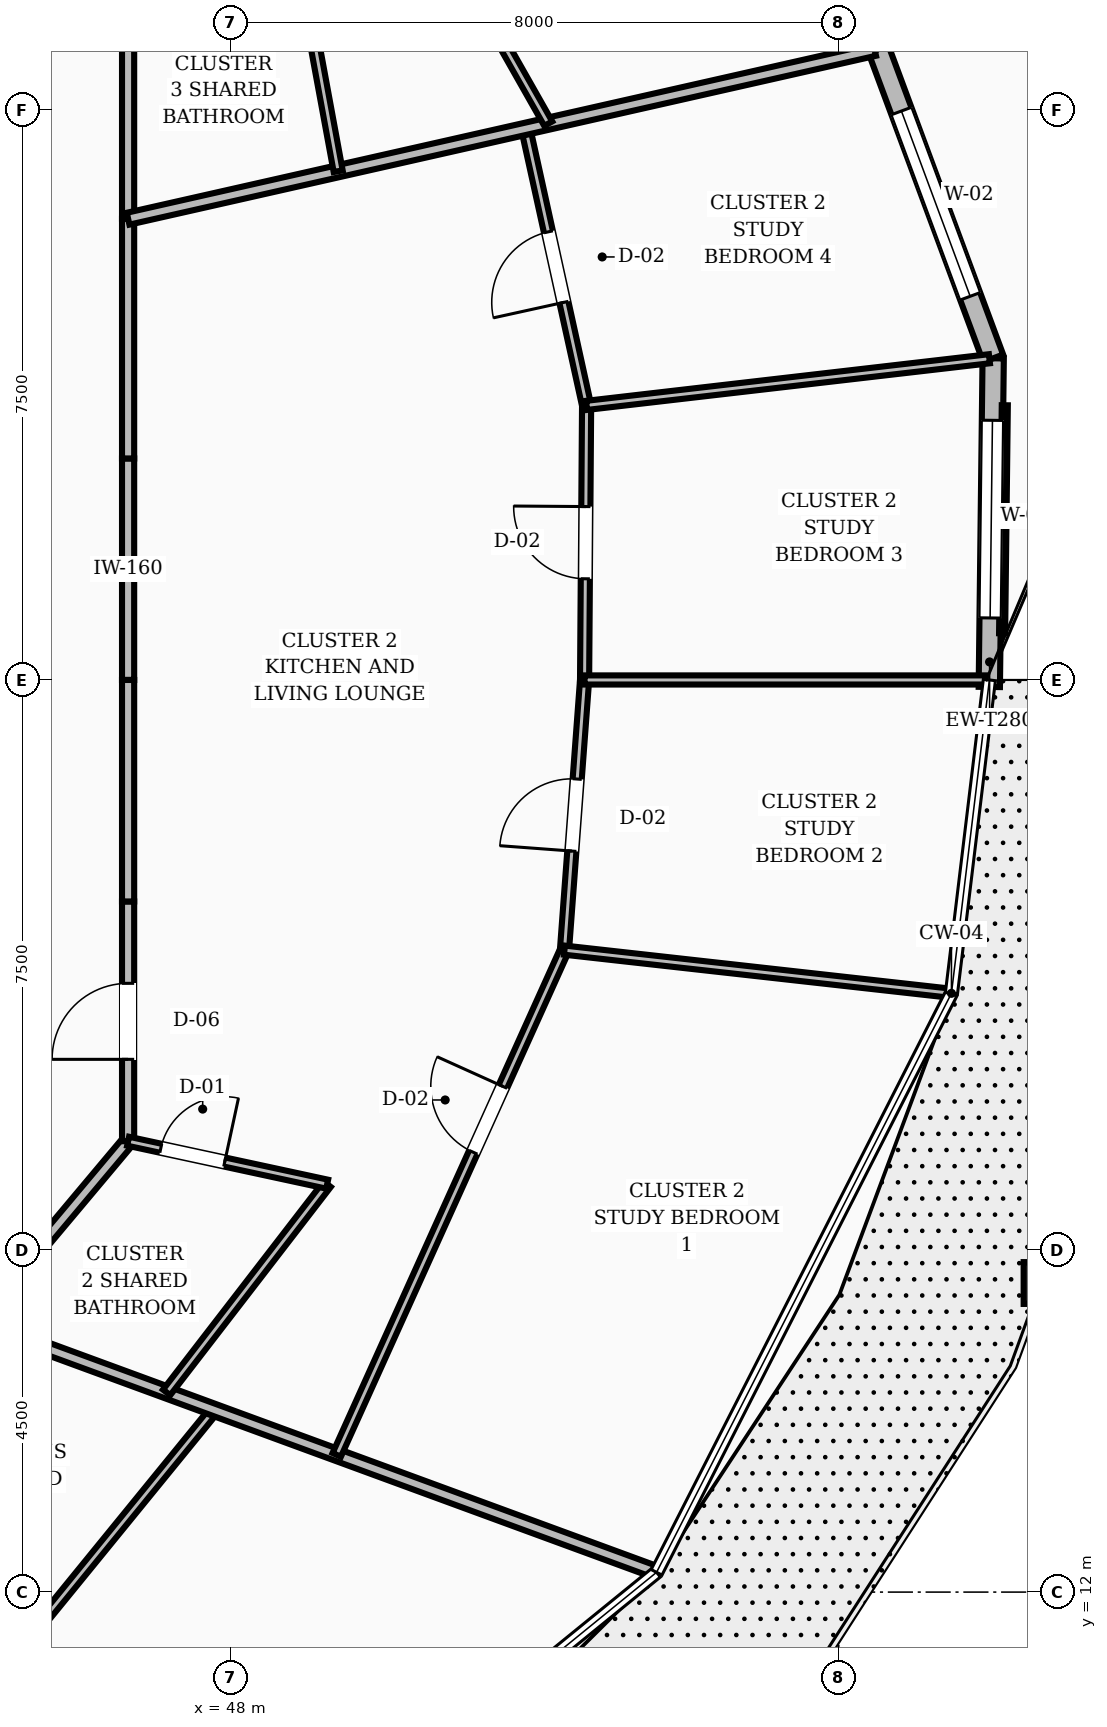
"""IFC4 building model, lengths in metres.
Left out: names, types, materials, properties, quantities, classifications, styles, units other than length and angle.
Written with IfcOpenShell. Run it as: python <this file> out.ifc"""

import sys

from ifc_helpers import new_model, si_unit, direction, frame, frame_2d, origin, place, context, subcontext, project, spatial, rectangle, extrude, element, fill, save


model = new_model("IFC4")
c1 = context("Model", 3, precision=1e-05, world=origin(), true_north=direction((0.0, 1.0)))
c2 = subcontext(c1, "Body", "Model", "MODEL_VIEW")
j1 = project(units=[si_unit("LENGTHUNIT", "METRE"), si_unit("PLANEANGLEUNIT", "RADIAN")], contexts=[c1])
p1 = place(None, origin())
s1 = spatial("IfcSite", under=j1, at=p1, CompositionType="ELEMENT")
p2 = place(p1, origin())
s2 = spatial("IfcBuilding", under=s1, at=p2, CompositionType="ELEMENT")
p3 = place(p2, frame((0.0, 0.0, 135.2)))
s3 = spatial("IfcBuildingStorey", under=s2, at=p3, CompositionType="ELEMENT", Elevation=135.2)
p4 = place(p3, frame((57.98, 23.908, 0.0), z_axis=(0.0, 0.0, 1.0), x_axis=(0.011800420546, 0.999930372613, 0.0)))
e1 = element("IfcWall", 1, at=p4, inside=s3, PredefinedType="STANDARD", context=c2, shape_type="SweptSolid", body=[
    extrude(rectangle(XDim=4.324, YDim=0.28, at=frame_2d((2.162, 0.0))), origin(), (0.0, 0.0, 1.0), 2.82),
])
p5 = place(p4, frame((0.908, 0.0, 0.8)))
e2 = element("IfcOpeningElement", 2, at=p5, cuts=e1, PredefinedType="OPENING", context=c2, shape_type="SweptSolid", body=[
    extrude(rectangle(XDim=2.6, YDim=1.65, at=frame_2d((1.3, 0.825))), frame((0.0, 0.15, 0.0), z_axis=(0.0, -1.0, 0.0), x_axis=(1.0, 0.0, 0.0)), (0.0, 0.0, 1.0), 0.3),
])
p6 = place(p3, frame((58.031, 28.232, 0.0), z_axis=(0.0, 0.0, 1.0), x_axis=(-0.347959140817, 0.937509699321, 0.0)))
e3 = element("IfcWall", 3, at=p6, inside=s3, PredefinedType="STANDARD", context=c2, shape_type="SweptSolid", body=[
    extrude(rectangle(XDim=4.34, YDim=0.28, at=frame_2d((2.17, 0.0))), origin(), (0.0, 0.0, 1.0), 2.82),
])
p7 = place(p6, frame((0.87, 0.0, 0.8)))
e4 = element("IfcOpeningElement", 4, at=p7, cuts=e3, PredefinedType="OPENING", context=c2, shape_type="SweptSolid", body=[
    extrude(rectangle(XDim=2.6, YDim=1.65, at=frame_2d((1.3, 0.825))), frame((0.0, 0.15, 0.0), z_axis=(0.0, -1.0, 0.0), x_axis=(1.0, 0.0, 0.0)), (0.0, 0.0, 1.0), 0.3),
])
p8 = place(p3, frame((56.521, 32.301, 0.0), z_axis=(0.0, 0.0, 1.0), x_axis=(-0.547360926274, 0.83689665813, 0.0)))
e5 = element("IfcWall", 5, at=p8, inside=s3, PredefinedType="STANDARD", context=c2, shape_type="SweptSolid", body=[
    extrude(rectangle(XDim=4.481, YDim=0.28, at=frame_2d((2.24, 0.0))), origin(), (0.0, 0.0, 1.0), 2.82),
])
p9 = place(p3, frame((46.65, 24.0, 0.0), z_axis=(0.0, 0.0, 1.0), x_axis=(0.0, 1.0, 0.0)))
e6 = element("IfcWall", 6, at=p9, inside=s3, PredefinedType="SOLIDWALL", context=c2, shape_type="SweptSolid", body=[
    extrude(rectangle(XDim=2.914, YDim=0.16, at=frame_2d((1.457, 0.0))), origin(), (0.0, 0.0, 1.0), 2.8),
])
p10 = place(p3, frame((46.65, 26.914, 0.0), z_axis=(0.0, 0.0, 1.0), x_axis=(0.0, 1.0, 0.0)))
e7 = element("IfcWall", 7, at=p10, inside=s3, PredefinedType="SOLIDWALL", context=c2, shape_type="SweptSolid", body=[
    extrude(rectangle(XDim=3.154, YDim=0.16, at=frame_2d((1.577, 0.0))), origin(), (0.0, 0.0, 1.0), 2.8),
])
p11 = place(p3, frame((46.65, 30.068, 0.0), z_axis=(0.0, 0.0, 1.0), x_axis=(0.0, 1.0, 0.0)))
e8 = element("IfcWall", 8, at=p11, inside=s3, PredefinedType="SOLIDWALL", context=c2, shape_type="SweptSolid", body=[
    extrude(rectangle(XDim=3.721, YDim=0.16, at=frame_2d((1.86, 0.0))), origin(), (0.0, 0.0, 1.0), 2.8),
])
p12 = place(p3, frame((44.65, 15.548, 0.0), z_axis=(0.0, 0.0, 1.0), x_axis=(0.642665742791, 0.76614668507, 0.0)))
e9 = element("IfcWall", 9, at=p12, inside=s3, PredefinedType="SOLIDWALL", context=c2, shape_type="SweptSolid", body=[
    extrude(rectangle(XDim=3.112, YDim=0.16, at=frame_2d((1.556, 0.0))), origin(), (0.0, 0.0, 1.0), 2.8),
])
p13 = place(p3, frame((46.65, 17.932, 0.0), z_axis=(0.0, 0.0, 1.0), x_axis=(0.0, 1.0, 0.0)))
e10 = element("IfcWall", 10, at=p13, inside=s3, PredefinedType="SOLIDWALL", context=c2, shape_type="SweptSolid", body=[
    extrude(rectangle(XDim=3.154, YDim=0.16, at=frame_2d((1.577, 0.0))), origin(), (0.0, 0.0, 1.0), 2.8),
])
p14 = place(p13, frame((1.077, 0.0, 0.0)))
e11 = element("IfcOpeningElement", 11, at=p14, cuts=e10, PredefinedType="OPENING", context=c2, shape_type="SweptSolid", body=[
    extrude(rectangle(XDim=1.0, YDim=2.1, at=frame_2d((0.5, 1.05))), frame((0.0, 0.09, 0.0), z_axis=(0.0, -1.0, 0.0), x_axis=(1.0, 0.0, 0.0)), (0.0, 0.0, 1.0), 0.18),
])
p15 = place(p3, frame((46.65, 21.086, 0.0), z_axis=(0.0, 0.0, 1.0), x_axis=(0.0, 1.0, 0.0)))
e12 = element("IfcWall", 12, at=p15, inside=s3, PredefinedType="SOLIDWALL", context=c2, shape_type="SweptSolid", body=[
    extrude(rectangle(XDim=2.914, YDim=0.16, at=frame_2d((1.457, 0.0))), origin(), (0.0, 0.0, 1.0), 2.8),
])
p16 = place(p3, frame((45.548, 11.653, 0.0), z_axis=(0.0, 0.0, 1.0), x_axis=(0.631651457384, 0.775252498471, 0.0)))
e13 = element("IfcWall", 13, at=p16, inside=s3, PredefinedType="PARTITIONING", context=c2, shape_type="SweptSolid", body=[
    extrude(rectangle(XDim=3.54, YDim=0.12, at=frame_2d((1.77, 0.0))), origin(), (0.0, 0.0, 1.0), 2.8),
])
p17 = place(p3, frame((44.65, 15.548, 0.0), z_axis=(0.0, 0.0, 1.0), x_axis=(0.938723462169, -0.344671236939, 0.0)))
e14 = element("IfcWall", 14, at=p17, inside=s3, PredefinedType="SOLIDWALL", context=c2, shape_type="SweptSolid", body=[
    extrude(rectangle(XDim=9.487, YDim=0.16, at=frame_2d((4.744, 0.0))), origin(), (0.0, 0.0, 1.0), 2.8),
])
p18 = place(p3, frame((47.157, 14.627, 0.0), z_axis=(0.0, 0.0, 1.0), x_axis=(0.610617608408, 0.791925587604, 0.0)))
e15 = element("IfcWall", 15, at=p18, inside=s3, PredefinedType="PARTITIONING", context=c2, shape_type="SweptSolid", body=[
    extrude(rectangle(XDim=3.459, YDim=0.12, at=frame_2d((1.729, 0.0))), origin(), (0.0, 0.0, 1.0), 2.8),
])
p19 = place(p3, frame((46.65, 17.932, 0.0), z_axis=(0.0, 0.0, 1.0), x_axis=(0.97750005093, -0.21093518064, 0.0)))
e16 = element("IfcWall", 16, at=p19, inside=s3, PredefinedType="PARTITIONING", context=c2, shape_type="SweptSolid", body=[
    extrude(rectangle(XDim=2.679, YDim=0.12, at=frame_2d((1.34, 0.0))), origin(), (0.0, 0.0, 1.0), 2.8),
])
p20 = place(p19, frame((0.44, 0.0, 0.0)))
e17 = element("IfcOpeningElement", 17, at=p20, cuts=e16, PredefinedType="OPENING", context=c2, shape_type="SweptSolid", body=[
    extrude(rectangle(XDim=0.86, YDim=2.1, at=frame_2d((0.43, 1.05))), frame((0.0, 0.07, 0.0), z_axis=(0.0, -1.0, 0.0), x_axis=(1.0, 0.0, 0.0)), (0.0, 0.0, 1.0), 0.14),
])
p21 = place(p3, frame((49.395, 13.805, 0.0), z_axis=(0.0, 0.0, 1.0), x_axis=(0.411281396403, 0.911508427264, 0.0)))
e18 = element("IfcWall", 18, at=p21, inside=s3, PredefinedType="PARTITIONING", context=c2, shape_type="SweptSolid", body=[
    extrude(rectangle(XDim=7.285, YDim=0.12, at=frame_2d((3.642, 0.0))), origin(), (0.0, 0.0, 1.0), 2.8),
])
p22 = place(p21, frame((4.367, 0.0, 0.0)))
e19 = element("IfcOpeningElement", 19, at=p22, cuts=e18, PredefinedType="OPENING", context=c2, shape_type="SweptSolid", body=[
    extrude(rectangle(XDim=0.95, YDim=2.1, at=frame_2d((0.475, 1.05))), frame((0.0, 0.07, 0.0), z_axis=(0.0, -1.0, 0.0), x_axis=(1.0, 0.0, 0.0)), (0.0, 0.0, 1.0), 0.14),
])
p23 = place(p3, frame((52.391, 20.446, 0.0), z_axis=(0.0, 0.0, 1.0), x_axis=(0.074182020041, 0.997244718162, 0.0)))
e20 = element("IfcWall", 20, at=p23, inside=s3, PredefinedType="PARTITIONING", context=c2, shape_type="SweptSolid", body=[
    extrude(rectangle(XDim=3.564, YDim=0.12, at=frame_2d((1.782, 0.0))), origin(), (0.0, 0.0, 1.0), 2.8),
])
p24 = place(p23, frame((1.307, 0.0, 0.0)))
e21 = element("IfcOpeningElement", 21, at=p24, cuts=e20, PredefinedType="OPENING", context=c2, shape_type="SweptSolid", body=[
    extrude(rectangle(XDim=0.95, YDim=2.1, at=frame_2d((0.475, 1.05))), frame((0.0, 0.07, 0.0), z_axis=(0.0, -1.0, 0.0), x_axis=(1.0, 0.0, 0.0)), (0.0, 0.0, 1.0), 0.14),
])
p25 = place(p3, frame((52.391, 20.446, 0.0), z_axis=(0.0, 0.0, 1.0), x_axis=(0.993832563856, -0.110891095313, 0.0)))
e22 = element("IfcWall", 22, at=p25, inside=s3, PredefinedType="PARTITIONING", context=c2, shape_type="SweptSolid", body=[
    extrude(rectangle(XDim=5.073, YDim=0.12, at=frame_2d((2.536, 0.0))), origin(), (0.0, 0.0, 1.0), 2.8),
])
p26 = place(p3, frame((52.656, 24.0, 0.0), z_axis=(0.0, 0.0, 1.0), x_axis=(0.007366656013, 0.999972865821, 0.0)))
e23 = element("IfcWall", 23, at=p26, inside=s3, PredefinedType="PARTITIONING", context=c2, shape_type="SweptSolid", body=[
    extrude(rectangle(XDim=3.612, YDim=0.12, at=frame_2d((1.806, 0.0))), origin(), (0.0, 0.0, 1.0), 2.8),
])
p27 = place(p26, frame((1.331, 0.0, 0.0)))
e24 = element("IfcOpeningElement", 24, at=p27, cuts=e23, PredefinedType="OPENING", context=c2, shape_type="SweptSolid", body=[
    extrude(rectangle(XDim=0.95, YDim=2.1, at=frame_2d((0.475, 1.05))), frame((0.0, 0.07, 0.0), z_axis=(0.0, -1.0, 0.0), x_axis=(1.0, 0.0, 0.0)), (0.0, 0.0, 1.0), 0.14),
])
p28 = place(p3, frame((52.656, 24.0, 0.0), z_axis=(0.0, 0.0, 1.0), x_axis=(1.0, 0.0, 0.0)))
e25 = element("IfcWall", 25, at=p28, inside=s3, PredefinedType="PARTITIONING", context=c2, shape_type="SweptSolid", body=[
    extrude(rectangle(XDim=5.276, YDim=0.12, at=frame_2d((2.638, 0.0))), origin(), (0.0, 0.0, 1.0), 2.8),
])
p29 = place(p3, frame((52.682, 27.612, 0.0), z_axis=(0.0, 0.0, 1.0), x_axis=(-0.214841783998, 0.976648866199, 0.0)))
e26 = element("IfcWall", 26, at=p29, inside=s3, PredefinedType="PARTITIONING", context=c2, shape_type="SweptSolid", body=[
    extrude(rectangle(XDim=3.726, YDim=0.12, at=frame_2d((1.863, 0.0))), origin(), (0.0, 0.0, 1.0), 2.8),
])
p30 = place(p29, frame((1.388, 0.0, 0.0)))
e27 = element("IfcOpeningElement", 27, at=p30, cuts=e26, PredefinedType="OPENING", context=c2, shape_type="SweptSolid", body=[
    extrude(rectangle(XDim=0.95, YDim=2.1, at=frame_2d((0.475, 1.05))), frame((0.0, 0.07, 0.0), z_axis=(0.0, -1.0, 0.0), x_axis=(1.0, 0.0, 0.0)), (0.0, 0.0, 1.0), 0.14),
])
p31 = place(p3, frame((52.682, 27.612, 0.0), z_axis=(0.0, 0.0, 1.0), x_axis=(0.993365373341, 0.115001021938, 0.0)))
e28 = element("IfcWall", 28, at=p31, inside=s3, PredefinedType="PARTITIONING", context=c2, shape_type="SweptSolid", body=[
    extrude(rectangle(XDim=5.335, YDim=0.12, at=frame_2d((2.667, 0.0))), origin(), (0.0, 0.0, 1.0), 2.8),
])
p32 = place(p3, frame((46.65, 30.068, 0.0), z_axis=(0.0, 0.0, 1.0), x_axis=(0.975360958505, 0.220615050765, 0.0)))
e29 = element("IfcWall", 29, at=p32, inside=s3, PredefinedType="SOLIDWALL", context=c2, shape_type="SweptSolid", body=[
    extrude(rectangle(XDim=10.07, YDim=0.16, at=frame_2d((5.035, 0.0))), origin(), (0.0, 0.0, 1.0), 2.8),
])
p33 = place(p3, frame((49.414, 30.693, 0.0), z_axis=(0.0, 0.0, 1.0), x_axis=(-0.181134567916, 0.983458320574, 0.0)))
e30 = element("IfcWall", 30, at=p33, inside=s3, PredefinedType="PARTITIONING", context=c2, shape_type="SweptSolid", body=[
    extrude(rectangle(XDim=3.792, YDim=0.12, at=frame_2d((1.896, 0.0))), origin(), (0.0, 0.0, 1.0), 2.8),
])
p34 = place(p3, frame((52.178, 31.318, 0.0), z_axis=(0.0, 0.0, 1.0), x_axis=(-0.493371027673, 0.869818963378, 0.0)))
e31 = element("IfcWall", 31, at=p34, inside=s3, PredefinedType="PARTITIONING", context=c2, shape_type="SweptSolid", body=[
    extrude(rectangle(XDim=8.024, YDim=0.12, at=frame_2d((4.012, 0.0))), origin(), (0.0, 0.0, 1.0), 2.8),
])
p35 = place(p34, frame((4.9, 0.0, 0.0)))
e32 = element("IfcOpeningElement", 32, at=p35, cuts=e31, PredefinedType="OPENING", context=c2, shape_type="SweptSolid", body=[
    extrude(rectangle(XDim=0.95, YDim=2.1, at=frame_2d((0.475, 1.05))), frame((0.0, 0.07, 0.0), z_axis=(0.0, -1.0, 0.0), x_axis=(1.0, 0.0, 0.0)), (0.0, 0.0, 1.0), 0.14),
])
p36 = place(p5, origin())
e33 = element("IfcWindow", 33, at=p36, inside=s3, PartitioningType="SINGLE_PANEL", PredefinedType="WINDOW", context=c2, shape_type="SweptSolid", body=[
    extrude(rectangle(XDim=2.6, YDim=1.65, at=frame_2d((1.3, 0.825))), frame((0.0, 0.03, 0.0), z_axis=(0.0, -1.0, 0.0), x_axis=(1.0, 0.0, 0.0)), (0.0, 0.0, 1.0), 0.06),
])
fill(e2, e33)
p37 = place(p7, origin())
e34 = element("IfcWindow", 34, at=p37, inside=s3, PartitioningType="SINGLE_PANEL", PredefinedType="WINDOW", context=c2, shape_type="SweptSolid", body=[
    extrude(rectangle(XDim=2.6, YDim=1.65, at=frame_2d((1.3, 0.825))), frame((0.0, 0.03, 0.0), z_axis=(0.0, -1.0, 0.0), x_axis=(1.0, 0.0, 0.0)), (0.0, 0.0, 1.0), 0.06),
])
fill(e4, e34)
p38 = place(p20, origin())
e35 = element("IfcDoor", 35, at=p38, inside=s3, OperationType="SINGLE_SWING_RIGHT", PredefinedType="DOOR", context=c2, shape_type="SweptSolid", body=[
    extrude(rectangle(XDim=0.86, YDim=2.1, at=frame_2d((0.43, 1.05))), frame((0.0, 0.025, 0.0), z_axis=(0.0, -1.0, 0.0), x_axis=(1.0, 0.0, 0.0)), (0.0, 0.0, 1.0), 0.05),
])
fill(e17, e35)
p39 = place(p14, origin())
e36 = element("IfcDoor", 36, at=p39, inside=s3, OperationType="SINGLE_SWING_LEFT", PredefinedType="DOOR", context=c2, shape_type="SweptSolid", body=[
    extrude(rectangle(XDim=1.0, YDim=2.1, at=frame_2d((0.5, 1.05))), frame((0.0, 0.025, 0.0), z_axis=(0.0, -1.0, 0.0), x_axis=(1.0, 0.0, 0.0)), (0.0, 0.0, 1.0), 0.05),
])
fill(e11, e36)
p40 = place(p22, origin())
e37 = element("IfcDoor", 37, at=p40, inside=s3, OperationType="SINGLE_SWING_RIGHT", PredefinedType="DOOR", context=c2, shape_type="SweptSolid", body=[
    extrude(rectangle(XDim=0.95, YDim=2.1, at=frame_2d((0.475, 1.05))), frame((0.0, 0.025, 0.0), z_axis=(0.0, -1.0, 0.0), x_axis=(1.0, 0.0, 0.0)), (0.0, 0.0, 1.0), 0.05),
])
fill(e19, e37)
p41 = place(p24, origin())
e38 = element("IfcDoor", 38, at=p41, inside=s3, OperationType="SINGLE_SWING_LEFT", PredefinedType="DOOR", context=c2, shape_type="SweptSolid", body=[
    extrude(rectangle(XDim=0.95, YDim=2.1, at=frame_2d((0.475, 1.05))), frame((0.0, 0.025, 0.0), z_axis=(0.0, -1.0, 0.0), x_axis=(1.0, 0.0, 0.0)), (0.0, 0.0, 1.0), 0.05),
])
fill(e21, e38)
p42 = place(p27, origin())
e39 = element("IfcDoor", 39, at=p42, inside=s3, OperationType="SINGLE_SWING_RIGHT", PredefinedType="DOOR", context=c2, shape_type="SweptSolid", body=[
    extrude(rectangle(XDim=0.95, YDim=2.1, at=frame_2d((0.475, 1.05))), frame((0.0, 0.025, 0.0), z_axis=(0.0, -1.0, 0.0), x_axis=(1.0, 0.0, 0.0)), (0.0, 0.0, 1.0), 0.05),
])
fill(e24, e39)
p43 = place(p30, origin())
e40 = element("IfcDoor", 40, at=p43, inside=s3, OperationType="SINGLE_SWING_LEFT", PredefinedType="DOOR", context=c2, shape_type="SweptSolid", body=[
    extrude(rectangle(XDim=0.95, YDim=2.1, at=frame_2d((0.475, 1.05))), frame((0.0, 0.025, 0.0), z_axis=(0.0, -1.0, 0.0), x_axis=(1.0, 0.0, 0.0)), (0.0, 0.0, 1.0), 0.05),
])
fill(e27, e40)
save(model, sys.argv[1])
